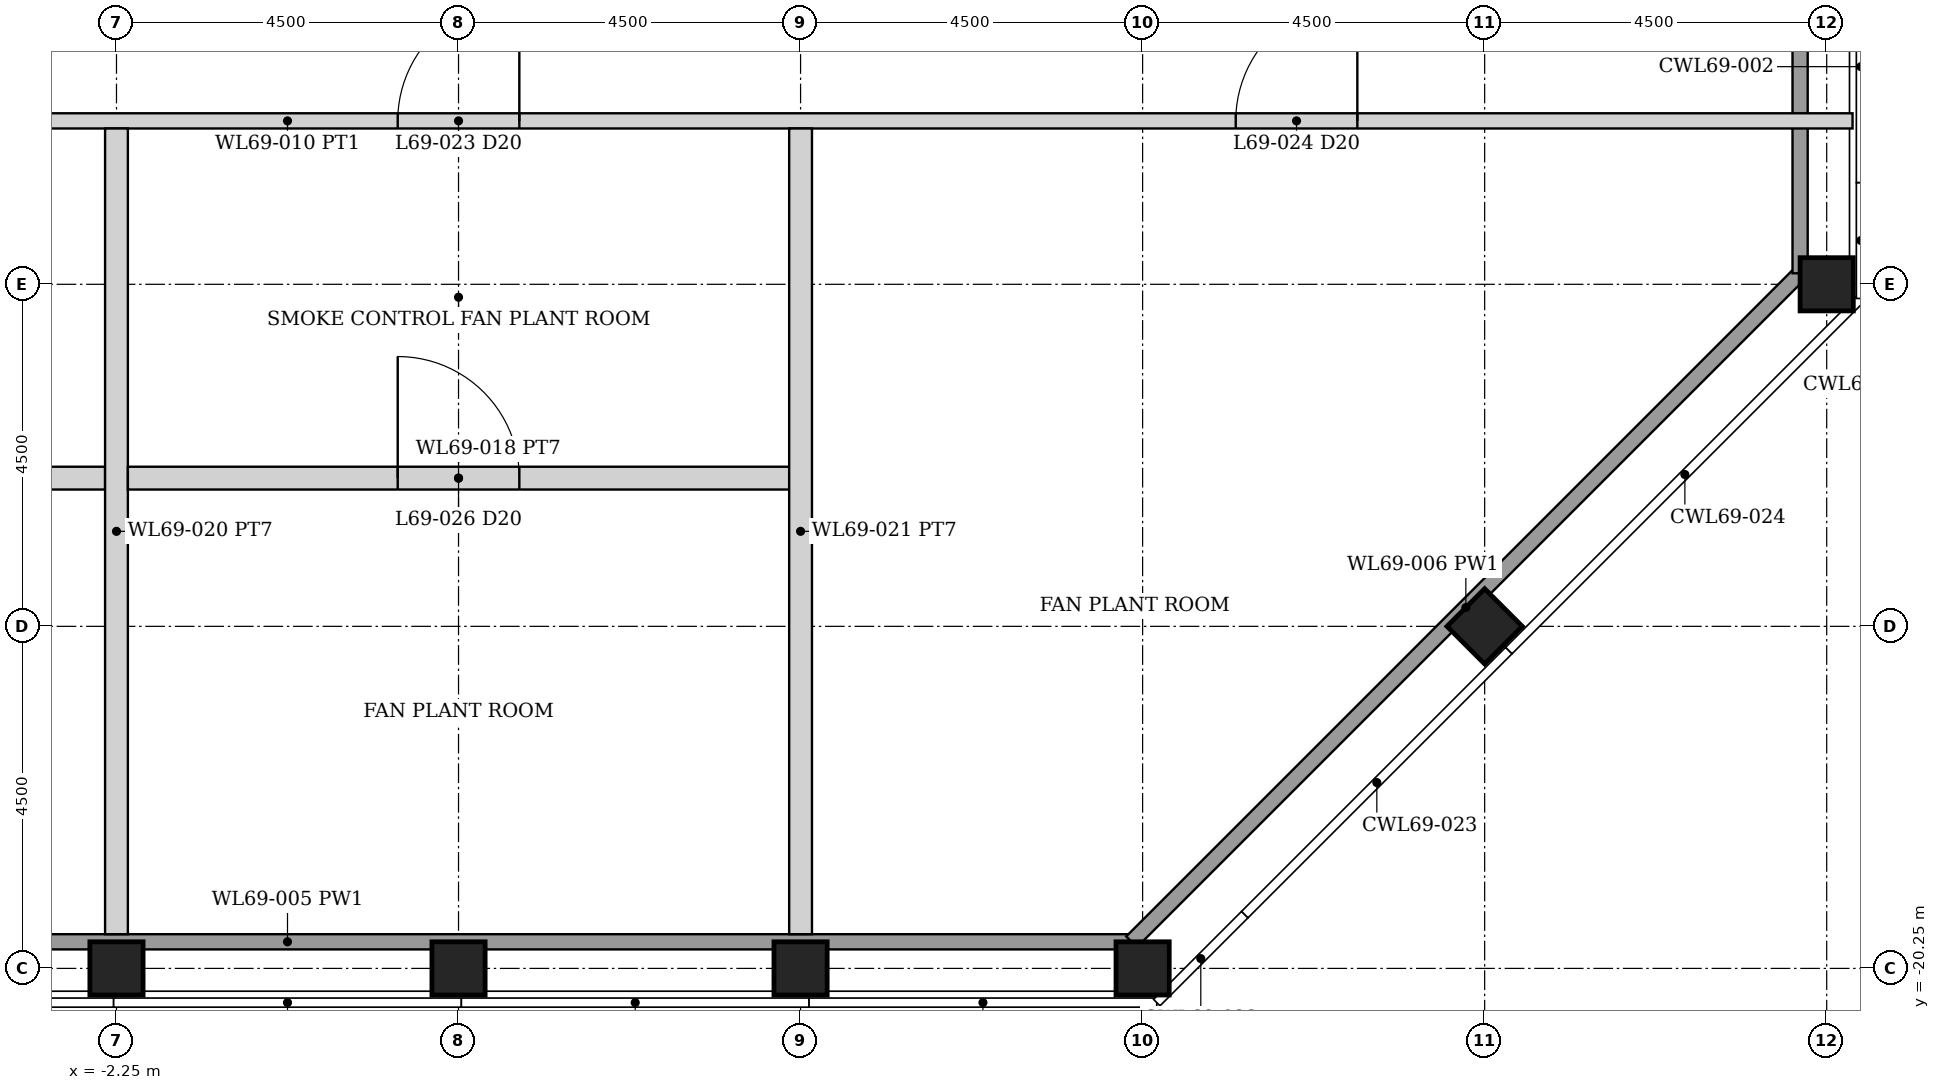
"""IFC4 building model, lengths in metres.
Left out: names, types, materials, properties, quantities, classifications, styles, units other than length and angle.
Written with IfcOpenShell. Run it as: python <this file> out.ifc"""

import sys

from ifc_helpers import new_model, si_unit, direction, frame, frame_2d, origin, origin_2d, place, context, subcontext, project, spatial, rectangle, hollow_rectangle, extrude, element, fill, save


model = new_model("IFC4")
c1 = context("Model", 3, precision=1e-05, world=origin(), true_north=direction((0.0, 1.0)))
c2 = subcontext(c1, "Body", "Model", "MODEL_VIEW")
j1 = project(units=[si_unit("LENGTHUNIT", "METRE"), si_unit("PLANEANGLEUNIT", "RADIAN")], contexts=[c1])
p1 = place(None, origin())
s1 = spatial("IfcSite", under=j1, at=p1, CompositionType="ELEMENT")
p2 = place(p1, origin())
s2 = spatial("IfcBuilding", under=s1, at=p2, CompositionType="ELEMENT")
p3 = place(p2, frame((0.0, 0.0, 268.05)))
s3 = spatial("IfcBuildingStorey", under=s2, at=p3, CompositionType="ELEMENT", Elevation=268.05)
for number, where, z_axis, x_axis in (
    (1, (20.25, -11.25, 0.0), (0.0, 0.0, 1.0), (1.0, 0.0, 0.0)),
    (2, (-2.25, -20.25, 0.0), (0.0, 0.0, 1.0), (0.0, 1.0, 0.0)),
    (3, (2.25, -20.25, 0.0), (0.0, 0.0, 1.0), (0.0, 1.0, 0.0)),
    (4, (6.75, -20.25, 0.0), (0.0, 0.0, 1.0), (0.0, 1.0, 0.0)),
    (5, (11.25, -20.25, 0.0), (0.0, 0.0, 1.0), (0.0, 1.0, 0.0)),
    (6, (15.75, -15.75, 0.0), (0.0, 0.0, 1.0), (0.707, -0.707, 0.0)),
):
    element("IfcColumn", number, at=place(p3, frame(where, z_axis=z_axis, x_axis=x_axis)), inside=s3, PredefinedType="COLUMN", context=c2, shape_type="SweptSolid", body=[
        extrude(hollow_rectangle(XDim=0.7, YDim=0.7, WallThickness=0.035, at=origin_2d()), origin(), (0.0, 0.0, 1.0), 6.0),
    ])
p4 = place(p3, frame((-11.105, -19.9, 6.0), z_axis=(0.0, 0.0, 1.0), x_axis=(1.0, 0.0, 0.0)))
e7 = element("IfcWall", 7, at=p4, inside=s3, PredefinedType="PARAPET", context=c2, shape_type="SweptSolid", body=[
    extrude(rectangle(XDim=22.21, YDim=0.2, at=frame_2d((11.105, 0.0))), origin(), (0.0, 0.0, 1.0), 1.1),
])
p5 = place(p3, frame((11.105, -19.9, 6.0), z_axis=(0.0, 0.0, 1.0), x_axis=(0.707106781187, 0.707106781187, 0.0)))
e8 = element("IfcWall", 8, at=p5, inside=s3, PredefinedType="PARAPET", context=c2, shape_type="SweptSolid", body=[
    extrude(rectangle(XDim=12.438, YDim=0.2, at=frame_2d((6.219, 0.0))), origin(), (0.0, 0.0, 1.0), 1.1),
])
p6 = place(p3, frame((19.9, -11.105, 6.0), z_axis=(0.0, 0.0, 1.0), x_axis=(0.0, 1.0, 0.0)))
e9 = element("IfcWall", 9, at=p6, inside=s3, PredefinedType="PARAPET", context=c2, shape_type="SweptSolid", body=[
    extrude(rectangle(XDim=22.21, YDim=0.2, at=frame_2d((11.105, 0.0))), origin(), (0.0, 0.0, 1.0), 1.1),
])
p7 = place(p3, frame((-20.59, -9.1, 0.0), z_axis=(0.0, 0.0, 1.0), x_axis=(1.0, 0.0, 0.0)))
e10 = element("IfcWall", 10, at=p7, inside=s3, PredefinedType="PARTITIONING", context=c2, shape_type="SweptSolid", body=[
    extrude(rectangle(XDim=41.18, YDim=0.2, at=frame_2d((20.59, 0.0))), origin(), (0.0, 0.0, 1.0), 4.829),
])
p8 = place(p7, frame((4.265, 0.0, 0.0)))
e11 = element("IfcOpeningElement", 11, at=p8, cuts=e10, PredefinedType="OPENING", context=c2, shape_type="SweptSolid", body=[
    extrude(rectangle(XDim=1.6, YDim=2.4, at=frame_2d((0.8, 1.2))), frame((0.0, 0.11, 0.0), z_axis=(0.0, -1.0, 0.0), x_axis=(1.0, 0.0, 0.0)), (0.0, 0.0, 1.0), 0.22),
])
p9 = place(p7, frame((13.34, 0.0, 0.0)))
e12 = element("IfcOpeningElement", 12, at=p9, cuts=e10, PredefinedType="OPENING", context=c2, shape_type="SweptSolid", body=[
    extrude(rectangle(XDim=1.0, YDim=2.1, at=frame_2d((0.5, 1.05))), frame((0.0, 0.11, 0.0), z_axis=(0.0, -1.0, 0.0), x_axis=(1.0, 0.0, 0.0)), (0.0, 0.0, 1.0), 0.22),
])
p10 = place(p7, frame((22.04, 0.0, 0.0)))
e13 = element("IfcOpeningElement", 13, at=p10, cuts=e10, PredefinedType="OPENING", context=c2, shape_type="SweptSolid", body=[
    extrude(rectangle(XDim=1.6, YDim=2.4, at=frame_2d((0.8, 1.2))), frame((0.0, 0.11, 0.0), z_axis=(0.0, -1.0, 0.0), x_axis=(1.0, 0.0, 0.0)), (0.0, 0.0, 1.0), 0.22),
])
p11 = place(p7, frame((33.065, 0.0, 0.0)))
e14 = element("IfcOpeningElement", 14, at=p11, cuts=e10, PredefinedType="OPENING", context=c2, shape_type="SweptSolid", body=[
    extrude(rectangle(XDim=1.6, YDim=2.4, at=frame_2d((0.8, 1.2))), frame((0.0, 0.11, 0.0), z_axis=(0.0, -1.0, 0.0), x_axis=(1.0, 0.0, 0.0)), (0.0, 0.0, 1.0), 0.22),
])
p12 = place(p3, frame((-11.1, -13.8, 0.0), z_axis=(0.0, 0.0, 1.0), x_axis=(1.0, 0.0, 0.0)))
e15 = element("IfcWall", 15, at=p12, inside=s3, PredefinedType="PARTITIONING", context=c2, shape_type="SweptSolid", body=[
    extrude(rectangle(XDim=8.7, YDim=0.3, at=frame_2d((4.35, 0.0))), origin(), (0.0, 0.0, 1.0), 4.829),
])
p13 = place(p12, frame((3.55, 0.0, 0.0)))
e16 = element("IfcOpeningElement", 16, at=p13, cuts=e15, PredefinedType="OPENING", context=c2, shape_type="SweptSolid", body=[
    extrude(rectangle(XDim=1.6, YDim=2.4, at=frame_2d((0.8, 1.2))), frame((0.0, 0.16, 0.0), z_axis=(0.0, -1.0, 0.0), x_axis=(1.0, 0.0, 0.0)), (0.0, 0.0, 1.0), 0.32),
])
p14 = place(p3, frame((-2.25, -19.8, 0.0), z_axis=(0.0, 0.0, 1.0), x_axis=(0.0, 1.0, 0.0)))
e17 = element("IfcWall", 17, at=p14, inside=s3, PredefinedType="PARTITIONING", context=c2, shape_type="SweptSolid", body=[
    extrude(rectangle(XDim=10.6, YDim=0.3, at=frame_2d((5.3, 0.0))), origin(), (0.0, 0.0, 1.0), 4.829),
])
p15 = place(p3, frame((-2.1, -13.8, 0.0), z_axis=(0.0, 0.0, 1.0), x_axis=(1.0, 0.0, 0.0)))
e18 = element("IfcWall", 18, at=p15, inside=s3, PredefinedType="PARTITIONING", context=c2, shape_type="SweptSolid", body=[
    extrude(rectangle(XDim=8.7, YDim=0.3, at=frame_2d((4.35, 0.0))), origin(), (0.0, 0.0, 1.0), 4.829),
])
p16 = place(p15, frame((3.55, 0.0, 0.0)))
e19 = element("IfcOpeningElement", 19, at=p16, cuts=e18, PredefinedType="OPENING", context=c2, shape_type="SweptSolid", body=[
    extrude(rectangle(XDim=1.6, YDim=2.4, at=frame_2d((0.8, 1.2))), frame((0.0, 0.16, 0.0), z_axis=(0.0, -1.0, 0.0), x_axis=(1.0, 0.0, 0.0)), (0.0, 0.0, 1.0), 0.32),
])
p17 = place(p3, frame((6.75, -19.8, 0.0), z_axis=(0.0, 0.0, 1.0), x_axis=(0.0, 1.0, 0.0)))
e20 = element("IfcWall", 20, at=p17, inside=s3, PredefinedType="PARTITIONING", context=c2, shape_type="SweptSolid", body=[
    extrude(rectangle(XDim=10.6, YDim=0.3, at=frame_2d((5.3, 0.0))), origin(), (0.0, 0.0, 1.0), 4.829),
])
p18 = place(p10, origin())
e21 = element("IfcDoor", 21, at=p18, inside=s3, OperationType="SINGLE_SWING_RIGHT", PredefinedType="DOOR", context=c2, shape_type="SweptSolid", body=[
    extrude(rectangle(XDim=1.6, YDim=2.4, at=frame_2d((0.8, 1.2))), frame((0.0, 0.025, 0.0), z_axis=(0.0, -1.0, 0.0), x_axis=(1.0, 0.0, 0.0)), (0.0, 0.0, 1.0), 0.05),
])
fill(e13, e21)
p19 = place(p16, origin())
e22 = element("IfcDoor", 22, at=p19, inside=s3, OperationType="SINGLE_SWING_LEFT", PredefinedType="DOOR", context=c2, shape_type="SweptSolid", body=[
    extrude(rectangle(XDim=1.6, YDim=2.4, at=frame_2d((0.8, 1.2))), frame((0.0, 0.025, 0.0), z_axis=(0.0, -1.0, 0.0), x_axis=(1.0, 0.0, 0.0)), (0.0, 0.0, 1.0), 0.05),
])
fill(e19, e22)
p20 = place(p11, origin())
e23 = element("IfcDoor", 23, at=p20, inside=s3, OperationType="SINGLE_SWING_RIGHT", PredefinedType="DOOR", context=c2, shape_type="SweptSolid", body=[
    extrude(rectangle(XDim=1.6, YDim=2.4, at=frame_2d((0.8, 1.2))), frame((0.0, 0.025, 0.0), z_axis=(0.0, -1.0, 0.0), x_axis=(1.0, 0.0, 0.0)), (0.0, 0.0, 1.0), 0.05),
])
fill(e14, e23)
save(model, sys.argv[1])
